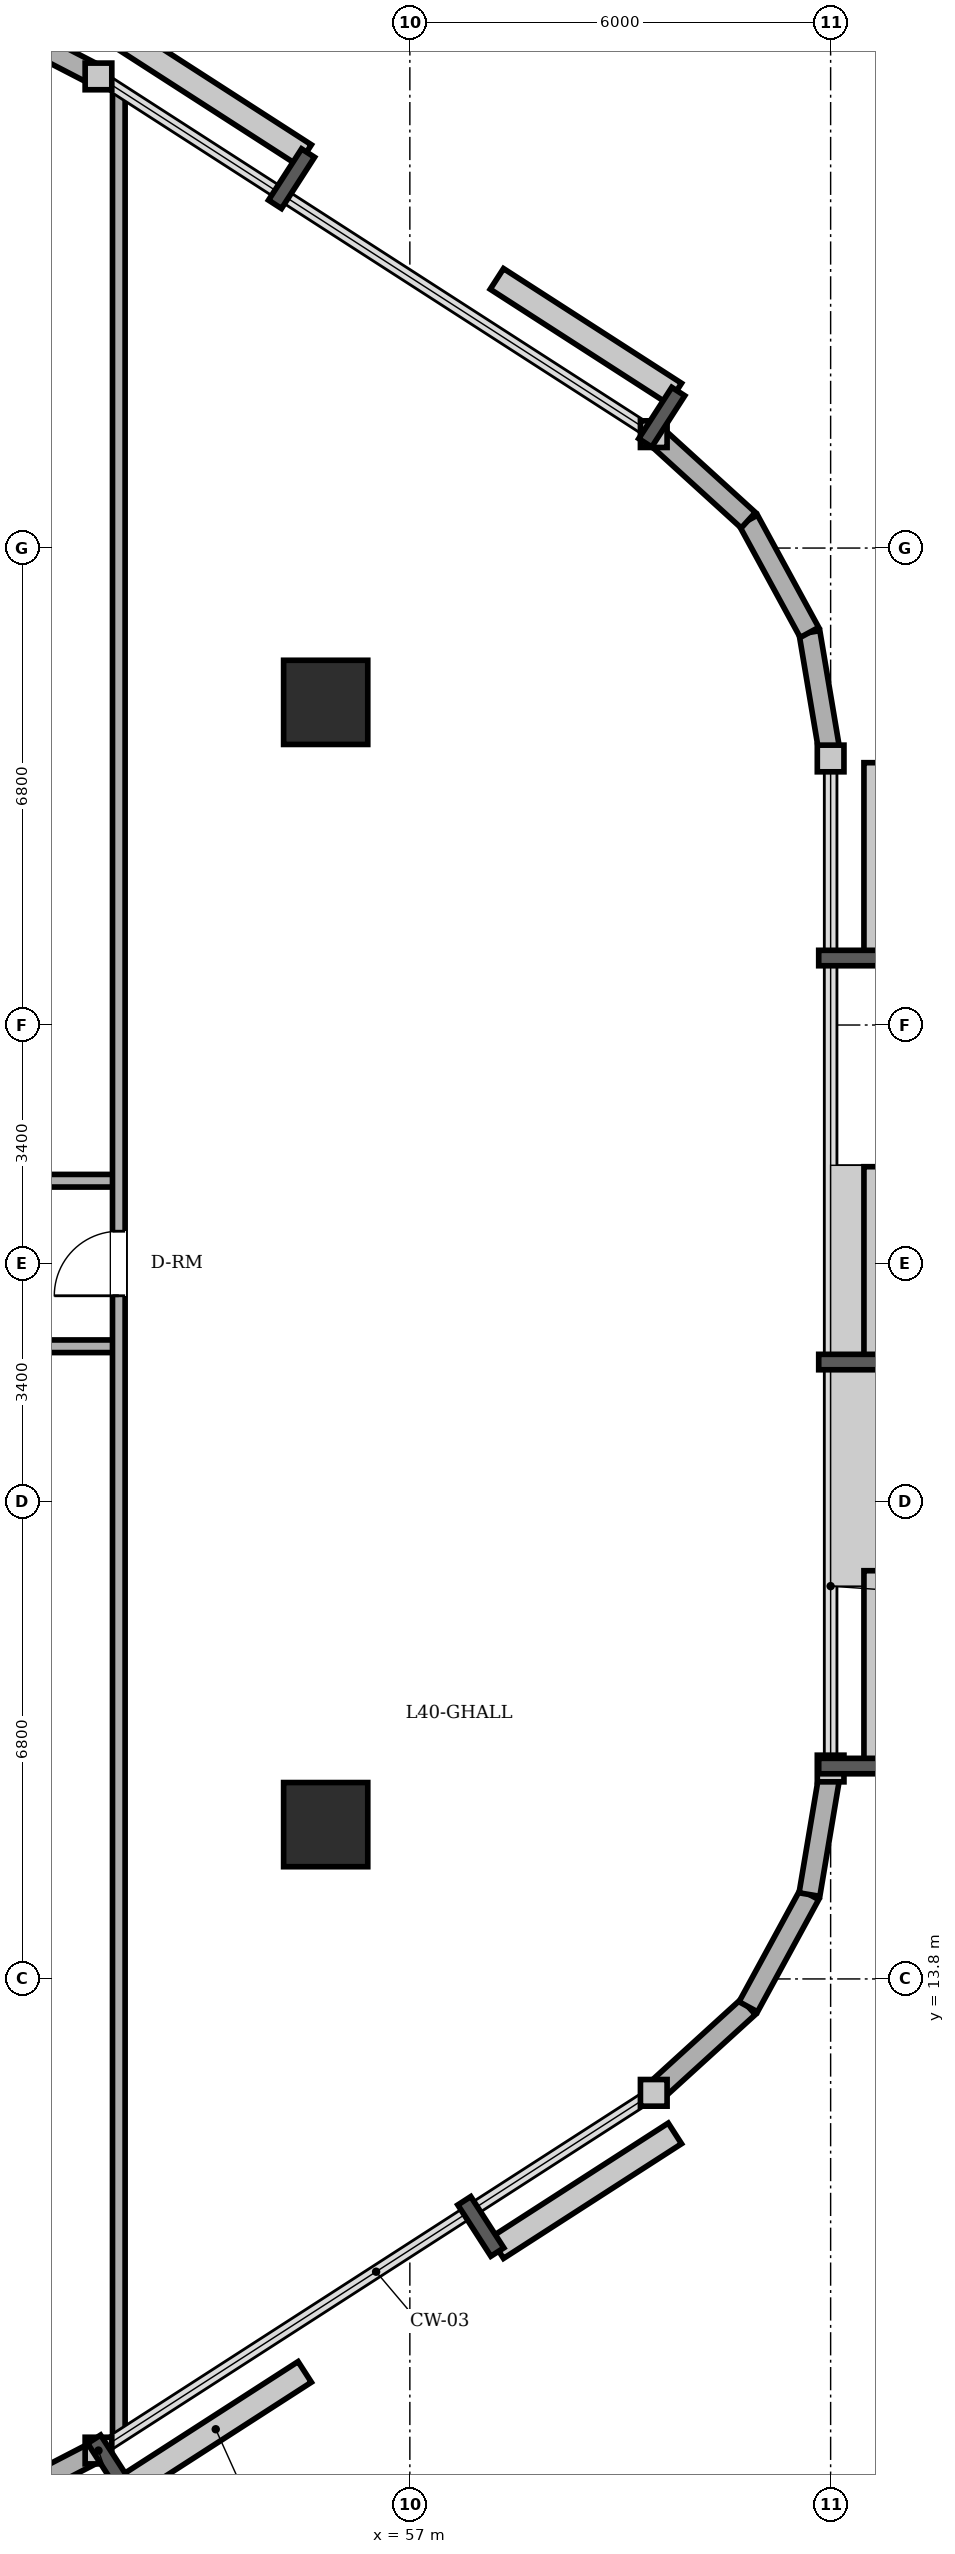
"""IFC4 building model, lengths in metres.
Left out: names, types, materials, properties, quantities, classifications, styles, units other than length and angle.
Written with IfcOpenShell. Run it as: python <this file> out.ifc"""

import sys

from ifc_helpers import new_model, si_unit, direction, frame, frame_2d, origin, origin_2d, place, context, subcontext, project, spatial, rectangle, circle, extrude, element, fill, save


model = new_model("IFC4")
c1 = context("Model", 3, precision=1e-05, world=origin(), true_north=direction((0.0, 1.0)))
c2 = subcontext(c1, "Body", "Model", "MODEL_VIEW")
j1 = project(units=[si_unit("LENGTHUNIT", "METRE"), si_unit("PLANEANGLEUNIT", "RADIAN")], contexts=[c1])
p1 = place(None, origin())
s1 = spatial("IfcSite", under=j1, at=p1, CompositionType="ELEMENT")
p2 = place(p1, origin())
s2 = spatial("IfcBuilding", under=s1, at=p2, CompositionType="ELEMENT")
p3 = place(p2, frame((0.0, 0.0, 154.6)))
s3 = spatial("IfcBuildingStorey", under=s2, at=p3, CompositionType="ELEMENT", Elevation=154.6)
for number, where, z_axis, x_axis in (
    (1, (55.8, 16.0, 0.0), (0.0, 0.0, 1.0), (1.0, 0.0, 0.0)),
    (2, (55.8, 32.0, 0.0), (0.0, 0.0, 1.0), (1.0, 0.0, 0.0)),
):
    element("IfcColumn", number, at=place(p3, frame(where, z_axis=z_axis, x_axis=x_axis)), inside=s3, PredefinedType="COLUMN", context=c2, shape_type="SweptSolid", body=[
        extrude(circle(Radius=0.6, at=origin_2d()), origin(), (0.0, 0.0, 1.0), 3.6),
    ])
p4 = place(p3, frame((51.63, 6.595, 0.0), z_axis=(0.0, 0.0, 1.0), x_axis=(0.888283247196, 0.459296062198, 0.0)))
e3 = element("IfcWall", 3, at=p4, inside=s3, PredefinedType="SOLIDWALL", context=c2, shape_type="SweptSolid", body=[
    extrude(rectangle(XDim=1.047, YDim=0.3, at=frame_2d((0.523, 0.0))), origin(), (0.0, 0.0, 1.0), 3.4),
])
p5 = place(p3, frame((60.478, 12.176, 0.0), z_axis=(0.0, 0.0, 1.0), x_axis=(0.73947929393, 0.673179302897, 0.0)))
e4 = element("IfcWall", 4, at=p5, inside=s3, PredefinedType="SOLIDWALL", context=c2, shape_type="SweptSolid", body=[
    extrude(rectangle(XDim=1.823, YDim=0.3, at=frame_2d((0.911, 0.0))), origin(), (0.0, 0.0, 1.0), 3.4),
])
p6 = place(p3, frame((61.826, 13.403, 0.0), z_axis=(0.0, 0.0, 1.0), x_axis=(0.478608030646, 0.878028674362, 0.0)))
e5 = element("IfcWall", 5, at=p6, inside=s3, PredefinedType="SOLIDWALL", context=c2, shape_type="SweptSolid", body=[
    extrude(rectangle(XDim=1.822, YDim=0.3, at=frame_2d((0.911, 0.0))), origin(), (0.0, 0.0, 1.0), 3.4),
])
for number, where, z_axis, x_axis in (
    (6, (62.698, 15.003, 0.0), (0.0, 0.0, 1.0), (0.166, 0.986, 0.0)),
    (7, (63.0, 31.2, 0.0), (0.0, 0.0, 1.0), (-0.166, 0.986, 0.0)),
):
    element("IfcWall", number, at=place(p3, frame(where, z_axis=z_axis, x_axis=x_axis)), inside=s3, PredefinedType="SOLIDWALL", context=c2, shape_type="SweptSolid", body=[
        extrude(rectangle(XDim=1.822, YDim=0.3, at=frame_2d((0.911, 0.0))), origin(), (0.0, 0.0, 1.0), 3.4),
    ])
p7 = place(p3, frame((62.698, 32.997, 0.0), z_axis=(0.0, 0.0, 1.0), x_axis=(-0.478608030646, 0.878028674362, 0.0)))
e8 = element("IfcWall", 8, at=p7, inside=s3, PredefinedType="SOLIDWALL", context=c2, shape_type="SweptSolid", body=[
    extrude(rectangle(XDim=1.822, YDim=0.3, at=frame_2d((0.911, 0.0))), origin(), (0.0, 0.0, 1.0), 3.4),
])
p8 = place(p3, frame((61.826, 34.597, 0.0), z_axis=(0.0, 0.0, 1.0), x_axis=(-0.73947929393, 0.673179302897, 0.0)))
e9 = element("IfcWall", 9, at=p8, inside=s3, PredefinedType="SOLIDWALL", context=c2, shape_type="SweptSolid", body=[
    extrude(rectangle(XDim=1.823, YDim=0.3, at=frame_2d((0.911, 0.0))), origin(), (0.0, 0.0, 1.0), 3.4),
])
p9 = place(p3, frame((52.56, 40.924, 0.0), z_axis=(0.0, 0.0, 1.0), x_axis=(-0.888283247196, 0.459296062198, 0.0)))
e10 = element("IfcWall", 10, at=p9, inside=s3, PredefinedType="SOLIDWALL", context=c2, shape_type="SweptSolid", body=[
    extrude(rectangle(XDim=1.047, YDim=0.3, at=frame_2d((0.523, 0.0))), origin(), (0.0, 0.0, 1.0), 3.4),
])
for number, where, z_axis, x_axis in (
    (11, (41.75, 22.82, 0.0), (0.0, 0.0, 1.0), (1.0, 0.0, 0.0)),
    (12, (41.75, 25.18, 0.0), (0.0, 0.0, 1.0), (1.0, 0.0, 0.0)),
):
    element("IfcWall", number, at=place(p3, frame(where, z_axis=z_axis, x_axis=x_axis)), inside=s3, PredefinedType="PARTITIONING", context=c2, shape_type="SweptSolid", body=[
        extrude(rectangle(XDim=11.1, YDim=0.18, at=frame_2d((5.55, 0.0))), origin(), (0.0, 0.0, 1.0), 3.4),
    ])
p10 = place(p3, frame((52.85, 7.263, 0.0), z_axis=(0.0, 0.0, 1.0), x_axis=(0.0, 1.0, 0.0)))
e13 = element("IfcWall", 13, at=p10, inside=s3, PredefinedType="PARTITIONING", context=c2, shape_type="SweptSolid", body=[
    extrude(rectangle(XDim=33.474, YDim=0.18, at=frame_2d((16.737, 0.0))), origin(), (0.0, 0.0, 1.0), 3.4),
])
p11 = place(p10, frame((16.277, 0.0, 0.0)))
e14 = element("IfcOpeningElement", 14, at=p11, cuts=e13, PredefinedType="OPENING", context=c2, shape_type="SweptSolid", body=[
    extrude(rectangle(XDim=0.92, YDim=2.1, at=frame_2d((0.46, 1.05))), frame((0.0, 0.1, 0.0), z_axis=(0.0, -1.0, 0.0), x_axis=(1.0, 0.0, 0.0)), (0.0, 0.0, 1.0), 0.2),
])
p12 = place(p11, origin())
e15 = element("IfcDoor", 15, at=p12, inside=s3, OperationType="SINGLE_SWING_LEFT", PredefinedType="DOOR", context=c2, shape_type="SweptSolid", body=[
    extrude(rectangle(XDim=0.92, YDim=2.1, at=frame_2d((0.46, 1.05))), frame((0.0, 0.025, 0.0), z_axis=(0.0, -1.0, 0.0), x_axis=(1.0, 0.0, 0.0)), (0.0, 0.0, 1.0), 0.05),
])
fill(e14, e15)
save(model, sys.argv[1])
